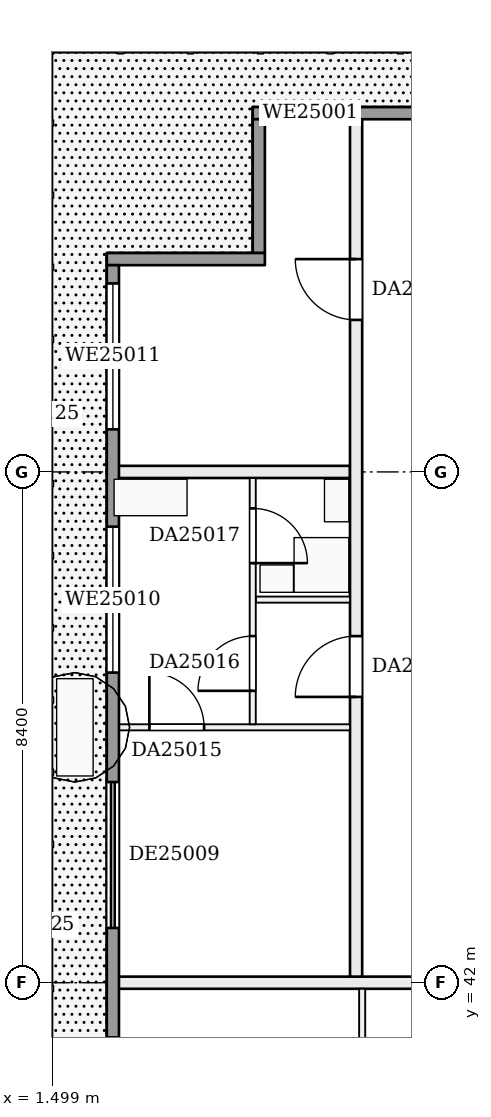
"""IFC4 building model, lengths in metres.
Left out: names, types, materials, properties, quantities, classifications, styles, units other than length and angle.
Written with IfcOpenShell. Run it as: python <this file> out.ifc"""

import sys

from ifc_helpers import new_model, si_unit, direction, frame, frame_2d, origin, place, context, subcontext, project, spatial, rectangle, extrude, element, fill, save


model = new_model("IFC4")
c1 = context("Model", 3, precision=1e-05, world=origin(), true_north=direction((0.0, 1.0)))
c2 = subcontext(c1, "Body", "Model", "MODEL_VIEW")
j1 = project(units=[si_unit("LENGTHUNIT", "METRE"), si_unit("PLANEANGLEUNIT", "RADIAN")], contexts=[c1])
p1 = place(None, origin())
s1 = spatial("IfcSite", under=j1, at=p1, CompositionType="ELEMENT")
p2 = place(p1, origin())
s2 = spatial("IfcBuilding", under=s1, at=p2, CompositionType="ELEMENT")
p3 = place(p2, frame((0.0, 0.0, 102.2)))
s3 = spatial("IfcBuildingStorey", under=s2, at=p3, CompositionType="ELEMENT", Elevation=102.2)
p4 = place(p3, frame((2.5, 42.0, 0.0), z_axis=(0.0, 0.0, 1.0), x_axis=(1.0, 0.0, 0.0)))
e1 = element("IfcWall", 1, at=p4, inside=s3, PredefinedType="PARTITIONING", context=c2, shape_type="SweptSolid", body=[
    extrude(rectangle(XDim=5.9, YDim=0.2, at=frame_2d((2.95, 0.0))), origin(), (0.0, 0.0, 1.0), 3.22),
])
p5 = place(p3, frame((2.5, 46.2, 0.0), z_axis=(0.0, 0.0, 1.0), x_axis=(1.0, 0.0, 0.0)))
e2 = element("IfcWall", 2, at=p5, inside=s3, PredefinedType="PARTITIONING", context=c2, shape_type="SweptSolid", body=[
    extrude(rectangle(XDim=3.9, YDim=0.1, at=frame_2d((1.95, 0.0))), origin(), (0.0, 0.0, 1.0), 3.22),
])
p6 = place(p5, frame((0.6, 0.0, 0.0)))
e3 = element("IfcOpeningElement", 3, at=p6, cuts=e2, PredefinedType="OPENING", context=c2, shape_type="SweptSolid", body=[
    extrude(rectangle(XDim=0.9, YDim=2.1, at=frame_2d((0.45, 1.05))), frame((0.0, 0.06, 0.0), z_axis=(0.0, -1.0, 0.0), x_axis=(1.0, 0.0, 0.0)), (0.0, 0.0, 1.0), 0.12),
])
p7 = place(p3, frame((4.85, 48.3, 0.0), z_axis=(0.0, 0.0, 1.0), x_axis=(1.0, 0.0, 0.0)))
e4 = element("IfcWall", 4, at=p7, inside=s3, PredefinedType="PARTITIONING", context=c2, shape_type="SweptSolid", body=[
    extrude(rectangle(XDim=1.55, YDim=0.1, at=frame_2d((0.775, 0.0))), origin(), (0.0, 0.0, 1.0), 3.22),
])
p8 = place(p3, frame((2.5, 50.4, 0.0), z_axis=(0.0, 0.0, 1.0), x_axis=(1.0, 0.0, 0.0)))
e5 = element("IfcWall", 5, at=p8, inside=s3, PredefinedType="PARTITIONING", context=c2, shape_type="SweptSolid", body=[
    extrude(rectangle(XDim=3.9, YDim=0.2, at=frame_2d((1.95, 0.0))), origin(), (0.0, 0.0, 1.0), 3.22),
])
p9 = place(p3, frame((4.8, 46.25, 0.0), z_axis=(0.0, 0.0, 1.0), x_axis=(0.0, 1.0, 0.0)))
e6 = element("IfcWall", 6, at=p9, inside=s3, PredefinedType="PARTITIONING", context=c2, shape_type="SweptSolid", body=[
    extrude(rectangle(XDim=4.05, YDim=0.1, at=frame_2d((2.025, 0.0))), origin(), (0.0, 0.0, 1.0), 3.22),
])
p10 = place(p9, frame((0.55, 0.0, 0.0)))
e7 = element("IfcOpeningElement", 7, at=p10, cuts=e6, PredefinedType="OPENING", context=c2, shape_type="SweptSolid", body=[
    extrude(rectangle(XDim=0.9, YDim=2.1, at=frame_2d((0.45, 1.05))), frame((0.0, 0.06, 0.0), z_axis=(0.0, -1.0, 0.0), x_axis=(1.0, 0.0, 0.0)), (0.0, 0.0, 1.0), 0.12),
])
p11 = place(p9, frame((2.65, 0.0, 0.0)))
e8 = element("IfcOpeningElement", 8, at=p11, cuts=e6, PredefinedType="OPENING", context=c2, shape_type="SweptSolid", body=[
    extrude(rectangle(XDim=0.9, YDim=2.1, at=frame_2d((0.45, 1.05))), frame((0.0, 0.06, 0.0), z_axis=(0.0, -1.0, 0.0), x_axis=(1.0, 0.0, 0.0)), (0.0, 0.0, 1.0), 0.12),
])
p12 = place(p3, frame((6.5, 42.1, 0.0), z_axis=(0.0, 0.0, 1.0), x_axis=(0.0, 1.0, 0.0)))
e9 = element("IfcWall", 9, at=p12, inside=s3, PredefinedType="PARTITIONING", context=c2, shape_type="SweptSolid", body=[
    extrude(rectangle(XDim=14.2, YDim=0.2, at=frame_2d((7.1, 0.0))), origin(), (0.0, 0.0, 1.0), 3.22),
])
p13 = place(p12, frame((4.6, 0.0, 0.0)))
e10 = element("IfcOpeningElement", 10, at=p13, cuts=e9, PredefinedType="OPENING", context=c2, shape_type="SweptSolid", body=[
    extrude(rectangle(XDim=1.0, YDim=2.1, at=frame_2d((0.5, 1.05))), frame((0.0, 0.11, 0.0), z_axis=(0.0, -1.0, 0.0), x_axis=(1.0, 0.0, 0.0)), (0.0, 0.0, 1.0), 0.22),
])
p14 = place(p12, frame((10.8, 0.0, 0.0)))
e11 = element("IfcOpeningElement", 11, at=p14, cuts=e9, PredefinedType="OPENING", context=c2, shape_type="SweptSolid", body=[
    extrude(rectangle(XDim=1.0, YDim=2.1, at=frame_2d((0.5, 1.05))), frame((0.0, 0.11, 0.0), z_axis=(0.0, -1.0, 0.0), x_axis=(1.0, 0.0, 0.0)), (0.0, 0.0, 1.0), 0.22),
])
p15 = place(p3, frame((6.6, 16.85, 0.0), z_axis=(0.0, 0.0, 1.0), x_axis=(0.0, 1.0, 0.0)))
e12 = element("IfcWall", 12, at=p15, inside=s3, PredefinedType="PARTITIONING", context=c2, shape_type="SweptSolid", body=[
    extrude(rectangle(XDim=25.05, YDim=0.1, at=frame_2d((12.525, 0.0))), origin(), (0.0, 0.0, 1.0), 3.22),
])
p16 = place(p15, frame((1.55, 0.0, 0.0)))
e13 = element("IfcOpeningElement", 13, at=p16, cuts=e12, PredefinedType="OPENING", context=c2, shape_type="SweptSolid", body=[
    extrude(rectangle(XDim=0.9, YDim=2.1, at=frame_2d((0.45, 1.05))), frame((0.0, 0.06, 0.0), z_axis=(0.0, -1.0, 0.0), x_axis=(1.0, 0.0, 0.0)), (0.0, 0.0, 1.0), 0.12),
])
p17 = place(p15, frame((9.95, 0.0, 0.0)))
e14 = element("IfcOpeningElement", 14, at=p17, cuts=e12, PredefinedType="OPENING", context=c2, shape_type="SweptSolid", body=[
    extrude(rectangle(XDim=0.9, YDim=2.1, at=frame_2d((0.45, 1.05))), frame((0.0, 0.06, 0.0), z_axis=(0.0, -1.0, 0.0), x_axis=(1.0, 0.0, 0.0)), (0.0, 0.0, 1.0), 0.12),
])
p18 = place(p15, frame((18.35, 0.0, 0.0)))
e15 = element("IfcOpeningElement", 15, at=p18, cuts=e12, PredefinedType="OPENING", context=c2, shape_type="SweptSolid", body=[
    extrude(rectangle(XDim=0.9, YDim=2.1, at=frame_2d((0.45, 1.05))), frame((0.0, 0.06, 0.0), z_axis=(0.0, -1.0, 0.0), x_axis=(1.0, 0.0, 0.0)), (0.0, 0.0, 1.0), 0.12),
])
p19 = place(p15, frame((22.55, 0.0, 0.0)))
e16 = element("IfcOpeningElement", 16, at=p19, cuts=e12, PredefinedType="OPENING", context=c2, shape_type="SweptSolid", body=[
    extrude(rectangle(XDim=0.9, YDim=2.1, at=frame_2d((0.45, 1.05))), frame((0.0, 0.06, 0.0), z_axis=(0.0, -1.0, 0.0), x_axis=(1.0, 0.0, 0.0)), (0.0, 0.0, 1.0), 0.12),
])
p20 = place(p3, frame((8.4, 56.3, 0.0), z_axis=(0.0, 0.0, 1.0), x_axis=(-1.0, 0.0, 0.0)))
e17 = element("IfcWall", 17, at=p20, inside=s3, PredefinedType="SOLIDWALL", context=c2, shape_type="SweptSolid", body=[
    extrude(rectangle(XDim=3.6, YDim=0.2, at=frame_2d((1.8, 0.0))), origin(), (0.0, 0.0, 1.0), 3.22),
])
p21 = place(p20, frame((2.0, 0.0, 0.9)))
e18 = element("IfcOpeningElement", 18, at=p21, cuts=e17, PredefinedType="OPENING", context=c2, shape_type="SweptSolid", body=[
    extrude(rectangle(XDim=1.3, YDim=1.5, at=frame_2d((0.65, 0.75))), frame((0.0, 0.11, 0.0), z_axis=(0.0, -1.0, 0.0), x_axis=(1.0, 0.0, 0.0)), (0.0, 0.0, 1.0), 0.22),
])
p22 = place(p3, frame((4.9, 56.2, 0.0), z_axis=(0.0, 0.0, 1.0), x_axis=(0.0, -1.0, 0.0)))
e19 = element("IfcWall", 19, at=p22, inside=s3, PredefinedType="SOLIDWALL", context=c2, shape_type="SweptSolid", body=[
    extrude(rectangle(XDim=2.2, YDim=0.2, at=frame_2d((1.1, 0.0))), origin(), (0.0, 0.0, 1.0), 3.22),
])
p23 = place(p3, frame((5.0, 53.9, 0.0), z_axis=(0.0, 0.0, 1.0), x_axis=(-1.0, 0.0, 0.0)))
e20 = element("IfcWall", 20, at=p23, inside=s3, PredefinedType="SOLIDWALL", context=c2, shape_type="SweptSolid", body=[
    extrude(rectangle(XDim=2.6, YDim=0.2, at=frame_2d((1.3, 0.0))), origin(), (0.0, 0.0, 1.0), 3.22),
])
p24 = place(p3, frame((2.5, 53.8, 0.0), z_axis=(0.0, 0.0, 1.0), x_axis=(0.0, -1.0, 0.0)))
e21 = element("IfcWall", 21, at=p24, inside=s3, PredefinedType="SOLIDWALL", context=c2, shape_type="SweptSolid", body=[
    extrude(rectangle(XDim=40.4, YDim=0.2, at=frame_2d((20.2, 0.0))), origin(), (0.0, 0.0, 1.0), 3.22),
])
p25 = place(p24, frame((37.7, 0.0, 0.9)))
e22 = element("IfcOpeningElement", 22, at=p25, cuts=e21, PredefinedType="OPENING", context=c2, shape_type="SweptSolid", body=[
    extrude(rectangle(XDim=2.4, YDim=1.5, at=frame_2d((1.2, 0.75))), frame((0.0, 0.11, 0.0), z_axis=(0.0, -1.0, 0.0), x_axis=(1.0, 0.0, 0.0)), (0.0, 0.0, 1.0), 0.22),
])
p26 = place(p24, frame((33.7, 0.0, 0.9)))
e23 = element("IfcOpeningElement", 23, at=p26, cuts=e21, PredefinedType="OPENING", context=c2, shape_type="SweptSolid", body=[
    extrude(rectangle(XDim=2.4, YDim=1.5, at=frame_2d((1.2, 0.75))), frame((0.0, 0.11, 0.0), z_axis=(0.0, -1.0, 0.0), x_axis=(1.0, 0.0, 0.0)), (0.0, 0.0, 1.0), 0.22),
])
p27 = place(p24, frame((29.5, 0.0, 0.0)))
e24 = element("IfcOpeningElement", 24, at=p27, cuts=e21, PredefinedType="OPENING", context=c2, shape_type="SweptSolid", body=[
    extrude(rectangle(XDim=2.4, YDim=2.2, at=frame_2d((1.2, 1.1))), frame((0.0, 0.11, 0.0), z_axis=(0.0, -1.0, 0.0), x_axis=(1.0, 0.0, 0.0)), (0.0, 0.0, 1.0), 0.22),
])
p28 = place(p24, frame((25.3, 0.0, 0.0)))
e25 = element("IfcOpeningElement", 25, at=p28, cuts=e21, PredefinedType="OPENING", context=c2, shape_type="SweptSolid", body=[
    extrude(rectangle(XDim=2.4, YDim=2.2, at=frame_2d((1.2, 1.1))), frame((0.0, 0.11, 0.0), z_axis=(0.0, -1.0, 0.0), x_axis=(1.0, 0.0, 0.0)), (0.0, 0.0, 1.0), 0.22),
])
p29 = place(p24, frame((21.1, 0.0, 0.0)))
e26 = element("IfcOpeningElement", 26, at=p29, cuts=e21, PredefinedType="OPENING", context=c2, shape_type="SweptSolid", body=[
    extrude(rectangle(XDim=2.4, YDim=2.2, at=frame_2d((1.2, 1.1))), frame((0.0, 0.11, 0.0), z_axis=(0.0, -1.0, 0.0), x_axis=(1.0, 0.0, 0.0)), (0.0, 0.0, 1.0), 0.22),
])
p30 = place(p24, frame((16.9, 0.0, 0.9)))
e27 = element("IfcOpeningElement", 27, at=p30, cuts=e21, PredefinedType="OPENING", context=c2, shape_type="SweptSolid", body=[
    extrude(rectangle(XDim=2.4, YDim=1.5, at=frame_2d((1.2, 0.75))), frame((0.0, 0.11, 0.0), z_axis=(0.0, -1.0, 0.0), x_axis=(1.0, 0.0, 0.0)), (0.0, 0.0, 1.0), 0.22),
])
p31 = place(p24, frame((12.7, 0.0, 0.9)))
e28 = element("IfcOpeningElement", 28, at=p31, cuts=e21, PredefinedType="OPENING", context=c2, shape_type="SweptSolid", body=[
    extrude(rectangle(XDim=2.4, YDim=1.5, at=frame_2d((1.2, 0.75))), frame((0.0, 0.11, 0.0), z_axis=(0.0, -1.0, 0.0), x_axis=(1.0, 0.0, 0.0)), (0.0, 0.0, 1.0), 0.22),
])
p32 = place(p24, frame((8.5, 0.0, 0.0)))
e29 = element("IfcOpeningElement", 29, at=p32, cuts=e21, PredefinedType="OPENING", context=c2, shape_type="SweptSolid", body=[
    extrude(rectangle(XDim=2.4, YDim=2.2, at=frame_2d((1.2, 1.1))), frame((0.0, 0.11, 0.0), z_axis=(0.0, -1.0, 0.0), x_axis=(1.0, 0.0, 0.0)), (0.0, 0.0, 1.0), 0.22),
])
p33 = place(p24, frame((4.3, 0.0, 0.9)))
e30 = element("IfcOpeningElement", 30, at=p33, cuts=e21, PredefinedType="OPENING", context=c2, shape_type="SweptSolid", body=[
    extrude(rectangle(XDim=2.4, YDim=1.5, at=frame_2d((1.2, 0.75))), frame((0.0, 0.11, 0.0), z_axis=(0.0, -1.0, 0.0), x_axis=(1.0, 0.0, 0.0)), (0.0, 0.0, 1.0), 0.22),
])
p34 = place(p24, frame((0.3, 0.0, 0.9)))
e31 = element("IfcOpeningElement", 31, at=p34, cuts=e21, PredefinedType="OPENING", context=c2, shape_type="SweptSolid", body=[
    extrude(rectangle(XDim=2.4, YDim=1.5, at=frame_2d((1.2, 0.75))), frame((0.0, 0.11, 0.0), z_axis=(0.0, -1.0, 0.0), x_axis=(1.0, 0.0, 0.0)), (0.0, 0.0, 1.0), 0.22),
])
p35 = place(p6, origin())
e32 = element("IfcDoor", 32, at=p35, inside=s3, OperationType="SINGLE_SWING_LEFT", PredefinedType="DOOR", context=c2, shape_type="SweptSolid", body=[
    extrude(rectangle(XDim=0.9, YDim=2.1, at=frame_2d((0.45, 1.05))), frame((0.0, 0.025, 0.0), z_axis=(0.0, -1.0, 0.0), x_axis=(1.0, 0.0, 0.0)), (0.0, 0.0, 1.0), 0.05),
])
fill(e3, e32)
p36 = place(p10, origin())
e33 = element("IfcDoor", 33, at=p36, inside=s3, OperationType="SINGLE_SWING_LEFT", PredefinedType="DOOR", context=c2, shape_type="SweptSolid", body=[
    extrude(rectangle(XDim=0.9, YDim=2.1, at=frame_2d((0.45, 1.05))), frame((0.0, 0.025, 0.0), z_axis=(0.0, -1.0, 0.0), x_axis=(1.0, 0.0, 0.0)), (0.0, 0.0, 1.0), 0.05),
])
fill(e7, e33)
p37 = place(p11, frame((0.9, 0.0, 0.0), z_axis=(0.0, 0.0, 1.0), x_axis=(-1.0, 0.0, 0.0)))
e34 = element("IfcDoor", 34, at=p37, inside=s3, OperationType="SINGLE_SWING_RIGHT", PredefinedType="DOOR", context=c2, shape_type="SweptSolid", body=[
    extrude(rectangle(XDim=0.9, YDim=2.1, at=frame_2d((0.45, 1.05))), frame((0.0, 0.025, 0.0), z_axis=(0.0, -1.0, 0.0), x_axis=(1.0, 0.0, 0.0)), (0.0, 0.0, 1.0), 0.05),
])
fill(e8, e34)
p38 = place(p13, origin())
e35 = element("IfcDoor", 35, at=p38, inside=s3, OperationType="SINGLE_SWING_LEFT", PredefinedType="DOOR", context=c2, shape_type="SweptSolid", body=[
    extrude(rectangle(XDim=1.0, YDim=2.1, at=frame_2d((0.5, 1.05))), frame((0.0, 0.025, 0.0), z_axis=(0.0, -1.0, 0.0), x_axis=(1.0, 0.0, 0.0)), (0.0, 0.0, 1.0), 0.05),
])
fill(e10, e35)
p39 = place(p14, origin())
e36 = element("IfcDoor", 36, at=p39, inside=s3, OperationType="SINGLE_SWING_RIGHT", PredefinedType="DOOR", context=c2, shape_type="SweptSolid", body=[
    extrude(rectangle(XDim=1.0, YDim=2.1, at=frame_2d((0.5, 1.05))), frame((0.0, 0.025, 0.0), z_axis=(0.0, -1.0, 0.0), x_axis=(1.0, 0.0, 0.0)), (0.0, 0.0, 1.0), 0.05),
])
fill(e11, e36)
p40 = place(p21, origin())
e37 = element("IfcWindow", 37, at=p40, inside=s3, PartitioningType="SINGLE_PANEL", PredefinedType="WINDOW", context=c2, shape_type="SweptSolid", body=[
    extrude(rectangle(XDim=1.3, YDim=1.5, at=frame_2d((0.65, 0.75))), frame((0.0, 0.03, 0.0), z_axis=(0.0, -1.0, 0.0), x_axis=(1.0, 0.0, 0.0)), (0.0, 0.0, 1.0), 0.06),
])
fill(e18, e37)
p41 = place(p32, origin())
e38 = element("IfcDoor", 38, at=p41, inside=s3, OperationType="DOUBLE_DOOR_SLIDING", PredefinedType="DOOR", context=c2, shape_type="SweptSolid", body=[
    extrude(rectangle(XDim=2.4, YDim=2.2, at=frame_2d((1.2, 1.1))), frame((0.0, 0.025, 0.0), z_axis=(0.0, -1.0, 0.0), x_axis=(1.0, 0.0, 0.0)), (0.0, 0.0, 1.0), 0.05),
])
fill(e29, e38)
p42 = place(p33, origin())
e39 = element("IfcWindow", 39, at=p42, inside=s3, PartitioningType="SINGLE_PANEL", PredefinedType="WINDOW", context=c2, shape_type="SweptSolid", body=[
    extrude(rectangle(XDim=2.4, YDim=1.5, at=frame_2d((1.2, 0.75))), frame((0.0, 0.03, 0.0), z_axis=(0.0, -1.0, 0.0), x_axis=(1.0, 0.0, 0.0)), (0.0, 0.0, 1.0), 0.06),
])
fill(e30, e39)
p43 = place(p34, origin())
e40 = element("IfcWindow", 40, at=p43, inside=s3, PartitioningType="SINGLE_PANEL", PredefinedType="WINDOW", context=c2, shape_type="SweptSolid", body=[
    extrude(rectangle(XDim=2.4, YDim=1.5, at=frame_2d((1.2, 0.75))), frame((0.0, 0.03, 0.0), z_axis=(0.0, -1.0, 0.0), x_axis=(1.0, 0.0, 0.0)), (0.0, 0.0, 1.0), 0.06),
])
fill(e31, e40)
save(model, sys.argv[1])
